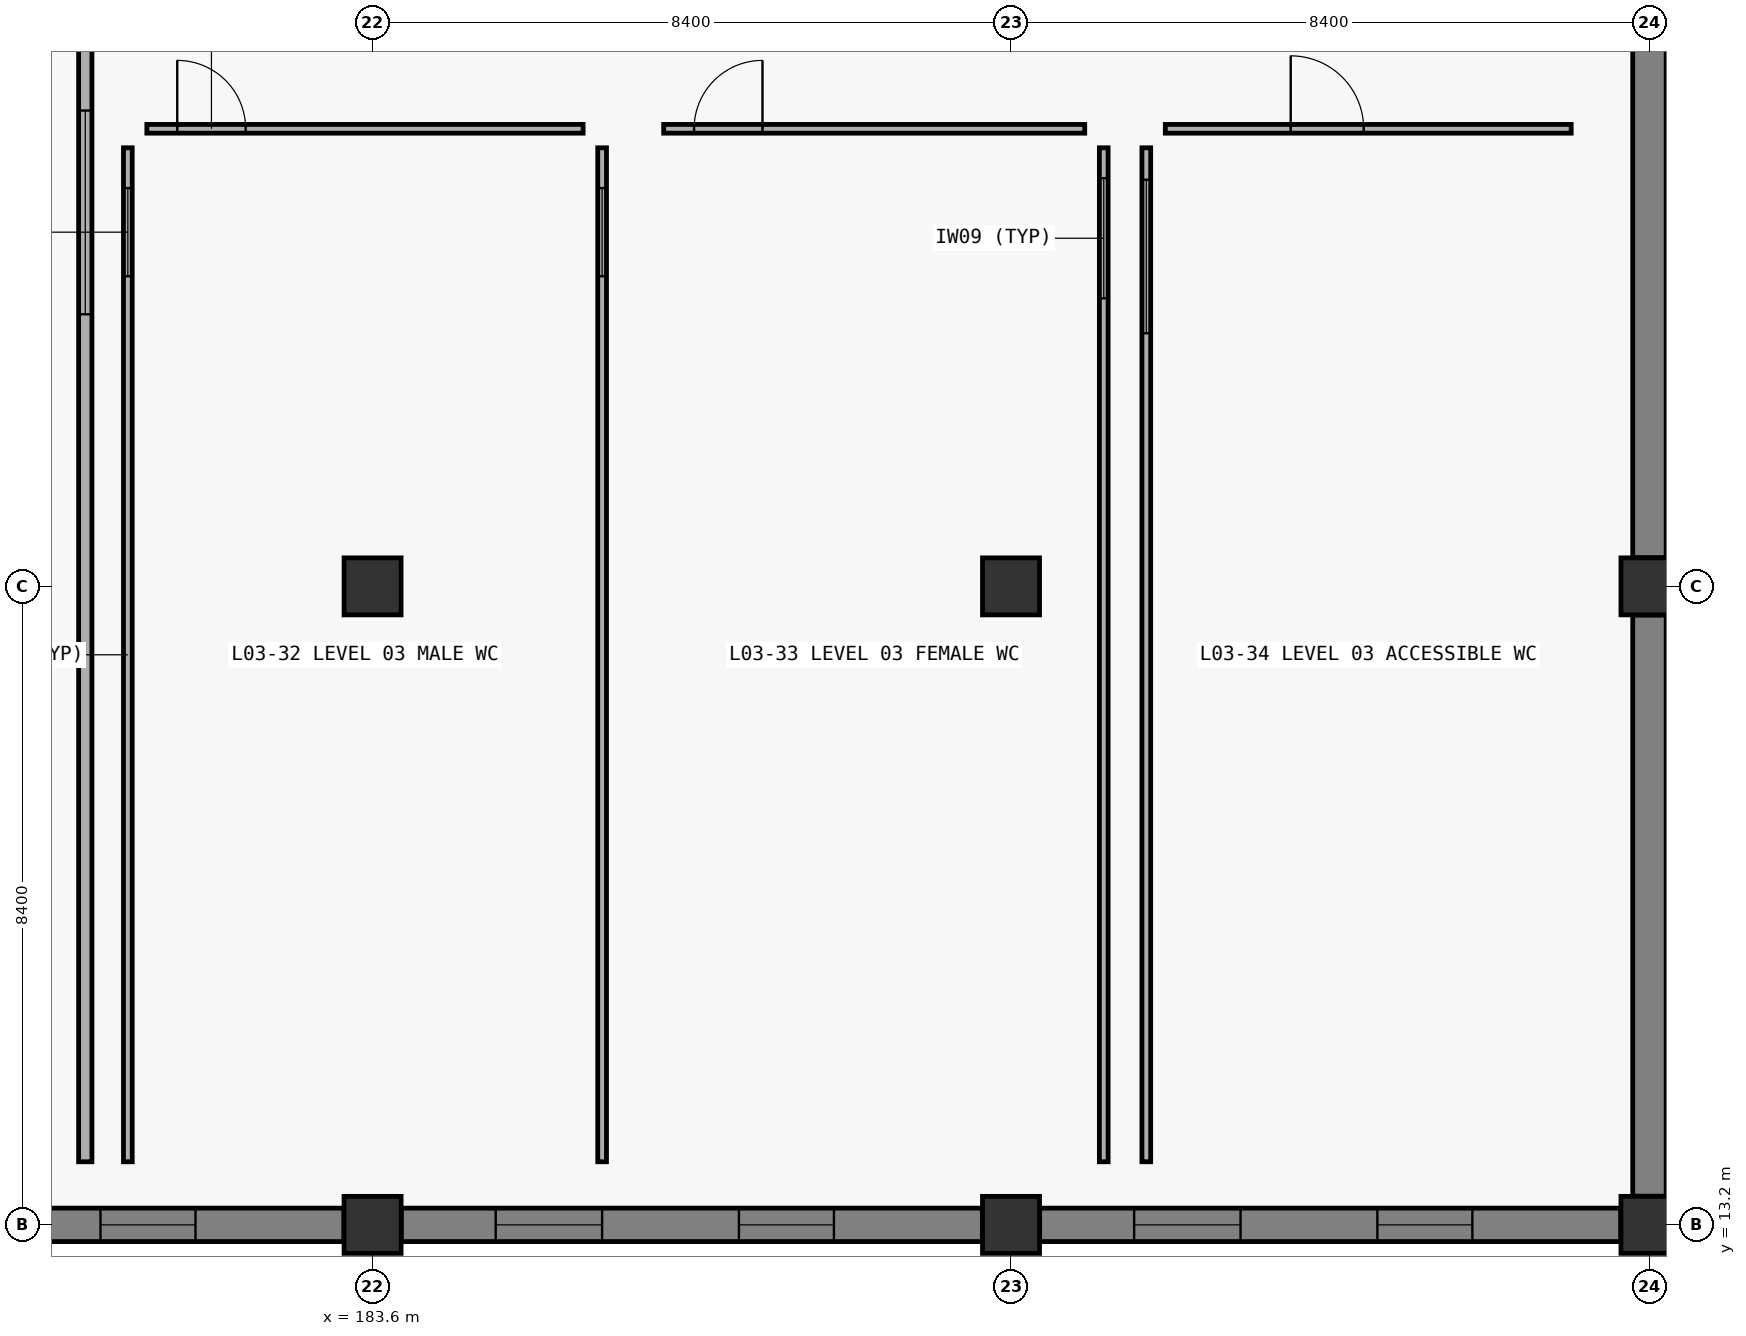
"""IFC4 building model, lengths in metres.
Left out: names, types, materials, properties, quantities, classifications, styles, units other than length and angle.
Written with IfcOpenShell. Run it as: python <this file> out.ifc"""

import sys

from ifc_helpers import new_model, si_unit, direction, frame, frame_2d, origin, origin_2d, place, context, subcontext, project, spatial, rectangle, extrude, element, fill, save


model = new_model("IFC4")
c1 = context("Model", 3, precision=1e-05, world=origin(), true_north=direction((0.0, 1.0)))
c2 = subcontext(c1, "Body", "Model", "MODEL_VIEW")
j1 = project(units=[si_unit("LENGTHUNIT", "METRE"), si_unit("PLANEANGLEUNIT", "RADIAN")], contexts=[c1])
p1 = place(None, origin())
s1 = spatial("IfcSite", under=j1, at=p1, CompositionType="ELEMENT")
p2 = place(p1, origin())
s2 = spatial("IfcBuilding", under=s1, at=p2, CompositionType="ELEMENT")
p3 = place(p2, frame((0.0, 0.0, 15.6)))
s3 = spatial("IfcBuildingStorey", under=s2, at=p3, CompositionType="ELEMENT", Elevation=15.6)
for number, where, z_axis, x_axis in (
    (1, (183.6, 13.2, 0.0), (0.0, 0.0, 1.0), (1.0, 0.0, 0.0)),
    (2, (183.6, 21.6, 0.0), (0.0, 0.0, 1.0), (1.0, 0.0, 0.0)),
    (3, (192.0, 13.2, 0.0), (0.0, 0.0, 1.0), (1.0, 0.0, 0.0)),
    (4, (192.0, 21.6, 0.0), (0.0, 0.0, 1.0), (1.0, 0.0, 0.0)),
    (5, (200.4, 13.2, 0.0), (0.0, 0.0, 1.0), (1.0, 0.0, 0.0)),
    (6, (200.4, 21.6, 0.0), (0.0, 0.0, 1.0), (1.0, 0.0, 0.0)),
):
    element("IfcColumn", number, at=place(p3, frame(where, z_axis=z_axis, x_axis=x_axis)), inside=s3, PredefinedType="COLUMN", context=c2, shape_type="SweptSolid", body=[
        extrude(rectangle(XDim=0.75, YDim=0.75, at=origin_2d()), origin(), (0.0, 0.0, 1.0), 5.1),
    ])
p4 = place(p3, frame((175.577, 13.2, 0.0), z_axis=(0.0, 0.0, 1.0), x_axis=(1.0, 0.0, 0.0)))
e7 = element("IfcWall", 7, at=p4, inside=s3, PredefinedType="SOLIDWALL", context=c2, shape_type="SweptSolid", body=[
    extrude(rectangle(XDim=7.646, YDim=0.44, at=frame_2d((3.823, 0.0))), origin(), (0.0, 0.0, 1.0), 4.36),
])
p5 = place(p4, frame((1.243, 0.0, 0.9)))
e8 = element("IfcOpeningElement", 8, at=p5, cuts=e7, PredefinedType="OPENING", context=c2, shape_type="SweptSolid", body=[
    extrude(rectangle(XDim=1.4, YDim=2.2, at=frame_2d((0.7, 1.1))), frame((0.0, 0.23, 0.0), z_axis=(0.0, -1.0, 0.0), x_axis=(1.0, 0.0, 0.0)), (0.0, 0.0, 1.0), 0.46),
])
p6 = place(p4, frame((4.443, 0.0, 0.9)))
e9 = element("IfcOpeningElement", 9, at=p6, cuts=e7, PredefinedType="OPENING", context=c2, shape_type="SweptSolid", body=[
    extrude(rectangle(XDim=1.25, YDim=2.05, at=frame_2d((0.625, 1.025))), frame((0.0, 0.23, 0.0), z_axis=(0.0, -1.0, 0.0), x_axis=(1.0, 0.0, 0.0)), (0.0, 0.0, 1.0), 0.46),
])
p7 = place(p3, frame((183.977, 13.2, 0.0), z_axis=(0.0, 0.0, 1.0), x_axis=(1.0, 0.0, 0.0)))
e10 = element("IfcWall", 10, at=p7, inside=s3, PredefinedType="SOLIDWALL", context=c2, shape_type="SweptSolid", body=[
    extrude(rectangle(XDim=7.646, YDim=0.44, at=frame_2d((3.823, 0.0))), origin(), (0.0, 0.0, 1.0), 4.11),
])
p8 = place(p7, frame((1.243, 0.0, 0.9)))
e11 = element("IfcOpeningElement", 11, at=p8, cuts=e10, PredefinedType="OPENING", context=c2, shape_type="SweptSolid", body=[
    extrude(rectangle(XDim=1.4, YDim=2.2, at=frame_2d((0.7, 1.1))), frame((0.0, 0.23, 0.0), z_axis=(0.0, -1.0, 0.0), x_axis=(1.0, 0.0, 0.0)), (0.0, 0.0, 1.0), 0.46),
])
p9 = place(p7, frame((4.443, 0.0, 0.9)))
e12 = element("IfcOpeningElement", 12, at=p9, cuts=e10, PredefinedType="OPENING", context=c2, shape_type="SweptSolid", body=[
    extrude(rectangle(XDim=1.25, YDim=2.05, at=frame_2d((0.625, 1.025))), frame((0.0, 0.23, 0.0), z_axis=(0.0, -1.0, 0.0), x_axis=(1.0, 0.0, 0.0)), (0.0, 0.0, 1.0), 0.46),
])
p10 = place(p3, frame((192.377, 13.2, 0.0), z_axis=(0.0, 0.0, 1.0), x_axis=(1.0, 0.0, 0.0)))
e13 = element("IfcWall", 13, at=p10, inside=s3, PredefinedType="SOLIDWALL", context=c2, shape_type="SweptSolid", body=[
    extrude(rectangle(XDim=7.646, YDim=0.44, at=frame_2d((3.823, 0.0))), origin(), (0.0, 0.0, 1.0), 4.36),
])
p11 = place(p10, frame((1.243, 0.0, 0.9)))
e14 = element("IfcOpeningElement", 14, at=p11, cuts=e13, PredefinedType="OPENING", context=c2, shape_type="SweptSolid", body=[
    extrude(rectangle(XDim=1.4, YDim=2.2, at=frame_2d((0.7, 1.1))), frame((0.0, 0.23, 0.0), z_axis=(0.0, -1.0, 0.0), x_axis=(1.0, 0.0, 0.0)), (0.0, 0.0, 1.0), 0.46),
])
p12 = place(p10, frame((4.443, 0.0, 0.9)))
e15 = element("IfcOpeningElement", 15, at=p12, cuts=e13, PredefinedType="OPENING", context=c2, shape_type="SweptSolid", body=[
    extrude(rectangle(XDim=1.25, YDim=2.05, at=frame_2d((0.625, 1.025))), frame((0.0, 0.23, 0.0), z_axis=(0.0, -1.0, 0.0), x_axis=(1.0, 0.0, 0.0)), (0.0, 0.0, 1.0), 0.46),
])
p13 = place(p3, frame((200.4, 13.577, 0.0), z_axis=(0.0, 0.0, 1.0), x_axis=(0.0, 1.0, 0.0)))
e16 = element("IfcWall", 16, at=p13, inside=s3, PredefinedType="SOLIDWALL", context=c2, shape_type="SweptSolid", body=[
    extrude(rectangle(XDim=7.646, YDim=0.44, at=frame_2d((3.823, 0.0))), origin(), (0.0, 0.0, 1.0), 4.31),
])
p14 = place(p3, frame((200.4, 21.977, 0.0), z_axis=(0.0, 0.0, 1.0), x_axis=(0.0, 1.0, 0.0)))
e17 = element("IfcWall", 17, at=p14, inside=s3, PredefinedType="SOLIDWALL", context=c2, shape_type="SweptSolid", body=[
    extrude(rectangle(XDim=8.846, YDim=0.44, at=frame_2d((4.423, 0.0))), origin(), (0.0, 0.0, 1.0), 4.31),
])
p15 = place(p3, frame((179.82, 14.03, 0.0), z_axis=(0.0, 0.0, 1.0), x_axis=(0.0, 1.0, 0.0)))
e18 = element("IfcWall", 18, at=p15, inside=s3, PredefinedType="PARTITIONING", context=c2, shape_type="SweptSolid", body=[
    extrude(rectangle(XDim=16.34, YDim=0.175, at=frame_2d((8.17, 0.0))), origin(), (0.0, 0.0, 1.0), 4.19),
])
p16 = place(p15, frame((11.15, 0.0, 0.9)))
e19 = element("IfcOpeningElement", 19, at=p16, cuts=e18, PredefinedType="OPENING", context=c2, shape_type="SweptSolid", body=[
    extrude(rectangle(XDim=2.68, YDim=1.52, at=frame_2d((1.34, 0.76))), frame((0.0, 0.097, 0.0), z_axis=(0.0, -1.0, 0.0), x_axis=(1.0, 0.0, 0.0)), (0.0, 0.0, 1.0), 0.195),
])
p17 = place(p3, frame((180.63, 27.62, 0.0), z_axis=(0.0, 0.0, 1.0), x_axis=(1.0, 0.0, 0.0)))
e20 = element("IfcWall", 20, at=p17, inside=s3, PredefinedType="PARTITIONING", context=c2, shape_type="SweptSolid", body=[
    extrude(rectangle(XDim=5.74, YDim=0.115, at=frame_2d((2.87, 0.0))), origin(), (0.0, 0.0, 1.0), 3.91),
])
p18 = place(p17, frame((0.4, 0.0, 0.0)))
e21 = element("IfcOpeningElement", 21, at=p18, cuts=e20, PredefinedType="OPENING", context=c2, shape_type="SweptSolid", body=[
    extrude(rectangle(XDim=0.9, YDim=2.1, at=frame_2d((0.45, 1.05))), frame((0.0, 0.067, 0.0), z_axis=(0.0, -1.0, 0.0), x_axis=(1.0, 0.0, 0.0)), (0.0, 0.0, 1.0), 0.135),
])
p19 = place(p3, frame((180.38, 14.03, 0.0), z_axis=(0.0, 0.0, 1.0), x_axis=(0.0, 1.0, 0.0)))
e22 = element("IfcWall", 22, at=p19, inside=s3, PredefinedType="PARTITIONING", context=c2, shape_type="SweptSolid", body=[
    extrude(rectangle(XDim=13.34, YDim=0.115, at=frame_2d((6.67, 0.0))), origin(), (0.0, 0.0, 1.0), 4.19),
])
p20 = place(p19, frame((11.65, 0.0, 0.9)))
e23 = element("IfcOpeningElement", 23, at=p20, cuts=e22, PredefinedType="OPENING", context=c2, shape_type="SweptSolid", body=[
    extrude(rectangle(XDim=1.16, YDim=1.62, at=frame_2d((0.58, 0.81))), frame((0.0, 0.067, 0.0), z_axis=(0.0, -1.0, 0.0), x_axis=(1.0, 0.0, 0.0)), (0.0, 0.0, 1.0), 0.135),
])
p21 = place(p3, frame((186.62, 14.03, 0.0), z_axis=(0.0, 0.0, 1.0), x_axis=(0.0, 1.0, 0.0)))
e24 = element("IfcWall", 24, at=p21, inside=s3, PredefinedType="PARTITIONING", context=c2, shape_type="SweptSolid", body=[
    extrude(rectangle(XDim=13.34, YDim=0.115, at=frame_2d((6.67, 0.0))), origin(), (0.0, 0.0, 1.0), 4.12),
])
p22 = place(p21, frame((11.65, 0.0, 0.9)))
e25 = element("IfcOpeningElement", 25, at=p22, cuts=e24, PredefinedType="OPENING", context=c2, shape_type="SweptSolid", body=[
    extrude(rectangle(XDim=1.16, YDim=1.62, at=frame_2d((0.58, 0.81))), frame((0.0, 0.067, 0.0), z_axis=(0.0, -1.0, 0.0), x_axis=(1.0, 0.0, 0.0)), (0.0, 0.0, 1.0), 0.135),
])
p23 = place(p3, frame((187.43, 27.62, 0.0), z_axis=(0.0, 0.0, 1.0), x_axis=(1.0, 0.0, 0.0)))
e26 = element("IfcWall", 26, at=p23, inside=s3, PredefinedType="PARTITIONING", context=c2, shape_type="SweptSolid", body=[
    extrude(rectangle(XDim=5.54, YDim=0.115, at=frame_2d((2.77, 0.0))), origin(), (0.0, 0.0, 1.0), 4.38),
])
p24 = place(p23, frame((0.4, 0.0, 0.0)))
e27 = element("IfcOpeningElement", 27, at=p24, cuts=e26, PredefinedType="OPENING", context=c2, shape_type="SweptSolid", body=[
    extrude(rectangle(XDim=0.9, YDim=2.1, at=frame_2d((0.45, 1.05))), frame((0.0, 0.067, 0.0), z_axis=(0.0, -1.0, 0.0), x_axis=(1.0, 0.0, 0.0)), (0.0, 0.0, 1.0), 0.135),
])
p25 = place(p3, frame((193.22, 14.03, 0.0), z_axis=(0.0, 0.0, 1.0), x_axis=(0.0, 1.0, 0.0)))
e28 = element("IfcWall", 28, at=p25, inside=s3, PredefinedType="PARTITIONING", context=c2, shape_type="SweptSolid", body=[
    extrude(rectangle(XDim=13.34, YDim=0.115, at=frame_2d((6.67, 0.0))), origin(), (0.0, 0.0, 1.0), 4.11),
])
p26 = place(p25, frame((11.36, 0.0, 0.9)))
e29 = element("IfcOpeningElement", 29, at=p26, cuts=e28, PredefinedType="OPENING", context=c2, shape_type="SweptSolid", body=[
    extrude(rectangle(XDim=1.58, YDim=1.24, at=frame_2d((0.79, 0.62))), frame((0.0, 0.067, 0.0), z_axis=(0.0, -1.0, 0.0), x_axis=(1.0, 0.0, 0.0)), (0.0, 0.0, 1.0), 0.135),
])
p27 = place(p3, frame((194.03, 27.62, 0.0), z_axis=(0.0, 0.0, 1.0), x_axis=(1.0, 0.0, 0.0)))
e30 = element("IfcWall", 30, at=p27, inside=s3, PredefinedType="PARTITIONING", context=c2, shape_type="SweptSolid", body=[
    extrude(rectangle(XDim=5.34, YDim=0.115, at=frame_2d((2.67, 0.0))), origin(), (0.0, 0.0, 1.0), 4.38),
])
p28 = place(p27, frame((1.65, 0.0, 0.0)))
e31 = element("IfcOpeningElement", 31, at=p28, cuts=e30, PredefinedType="OPENING", context=c2, shape_type="SweptSolid", body=[
    extrude(rectangle(XDim=0.96, YDim=2.14, at=frame_2d((0.48, 1.07))), frame((0.0, 0.067, 0.0), z_axis=(0.0, -1.0, 0.0), x_axis=(1.0, 0.0, 0.0)), (0.0, 0.0, 1.0), 0.135),
])
p29 = place(p3, frame((193.78, 14.03, 0.0), z_axis=(0.0, 0.0, 1.0), x_axis=(0.0, 1.0, 0.0)))
e32 = element("IfcWall", 32, at=p29, inside=s3, PredefinedType="PARTITIONING", context=c2, shape_type="SweptSolid", body=[
    extrude(rectangle(XDim=13.34, YDim=0.115, at=frame_2d((6.67, 0.0))), origin(), (0.0, 0.0, 1.0), 4.11),
])
p30 = place(p29, frame((10.9, 0.0, 0.9)))
e33 = element("IfcOpeningElement", 33, at=p30, cuts=e32, PredefinedType="OPENING", context=c2, shape_type="SweptSolid", body=[
    extrude(rectangle(XDim=2.02, YDim=1.32, at=frame_2d((1.01, 0.66))), frame((0.0, 0.067, 0.0), z_axis=(0.0, -1.0, 0.0), x_axis=(1.0, 0.0, 0.0)), (0.0, 0.0, 1.0), 0.135),
])
p31 = place(p6, origin())
e34 = element("IfcWindow", 34, at=p31, inside=s3, PartitioningType="SINGLE_PANEL", PredefinedType="WINDOW", context=c2, shape_type="SweptSolid", body=[
    extrude(rectangle(XDim=1.25, YDim=2.05, at=frame_2d((0.625, 1.025))), frame((0.0, 0.03, 0.0), z_axis=(0.0, -1.0, 0.0), x_axis=(1.0, 0.0, 0.0)), (0.0, 0.0, 1.0), 0.06),
])
fill(e9, e34)
p32 = place(p8, origin())
e35 = element("IfcWindow", 35, at=p32, inside=s3, PartitioningType="SINGLE_PANEL", PredefinedType="WINDOW", context=c2, shape_type="SweptSolid", body=[
    extrude(rectangle(XDim=1.4, YDim=2.2, at=frame_2d((0.7, 1.1))), frame((0.0, 0.03, 0.0), z_axis=(0.0, -1.0, 0.0), x_axis=(1.0, 0.0, 0.0)), (0.0, 0.0, 1.0), 0.06),
])
fill(e11, e35)
p33 = place(p9, origin())
e36 = element("IfcWindow", 36, at=p33, inside=s3, PartitioningType="SINGLE_PANEL", PredefinedType="WINDOW", context=c2, shape_type="SweptSolid", body=[
    extrude(rectangle(XDim=1.25, YDim=2.05, at=frame_2d((0.625, 1.025))), frame((0.0, 0.03, 0.0), z_axis=(0.0, -1.0, 0.0), x_axis=(1.0, 0.0, 0.0)), (0.0, 0.0, 1.0), 0.06),
])
fill(e12, e36)
p34 = place(p11, origin())
e37 = element("IfcWindow", 37, at=p34, inside=s3, PartitioningType="SINGLE_PANEL", PredefinedType="WINDOW", context=c2, shape_type="SweptSolid", body=[
    extrude(rectangle(XDim=1.4, YDim=2.2, at=frame_2d((0.7, 1.1))), frame((0.0, 0.03, 0.0), z_axis=(0.0, -1.0, 0.0), x_axis=(1.0, 0.0, 0.0)), (0.0, 0.0, 1.0), 0.06),
])
fill(e14, e37)
p35 = place(p12, origin())
e38 = element("IfcWindow", 38, at=p35, inside=s3, PartitioningType="SINGLE_PANEL", PredefinedType="WINDOW", context=c2, shape_type="SweptSolid", body=[
    extrude(rectangle(XDim=1.25, YDim=2.05, at=frame_2d((0.625, 1.025))), frame((0.0, 0.03, 0.0), z_axis=(0.0, -1.0, 0.0), x_axis=(1.0, 0.0, 0.0)), (0.0, 0.0, 1.0), 0.06),
])
fill(e15, e38)
p36 = place(p16, origin())
e39 = element("IfcWindow", 39, at=p36, inside=s3, PartitioningType="SINGLE_PANEL", PredefinedType="WINDOW", context=c2, shape_type="SweptSolid", body=[
    extrude(rectangle(XDim=2.68, YDim=1.52, at=frame_2d((1.34, 0.76))), frame((0.0, 0.03, 0.0), z_axis=(0.0, -1.0, 0.0), x_axis=(1.0, 0.0, 0.0)), (0.0, 0.0, 1.0), 0.06),
])
fill(e19, e39)
p37 = place(p18, origin())
e40 = element("IfcDoor", 40, at=p37, inside=s3, OperationType="SINGLE_SWING_LEFT", PredefinedType="DOOR", context=c2, shape_type="SweptSolid", body=[
    extrude(rectangle(XDim=0.9, YDim=2.1, at=frame_2d((0.45, 1.05))), frame((0.0, 0.025, 0.0), z_axis=(0.0, -1.0, 0.0), x_axis=(1.0, 0.0, 0.0)), (0.0, 0.0, 1.0), 0.05),
])
fill(e21, e40)
p38 = place(p20, origin())
e41 = element("IfcWindow", 41, at=p38, inside=s3, PartitioningType="SINGLE_PANEL", PredefinedType="WINDOW", context=c2, shape_type="SweptSolid", body=[
    extrude(rectangle(XDim=1.16, YDim=1.62, at=frame_2d((0.58, 0.81))), frame((0.0, 0.03, 0.0), z_axis=(0.0, -1.0, 0.0), x_axis=(1.0, 0.0, 0.0)), (0.0, 0.0, 1.0), 0.06),
])
fill(e23, e41)
p39 = place(p22, origin())
e42 = element("IfcWindow", 42, at=p39, inside=s3, PartitioningType="SINGLE_PANEL", PredefinedType="WINDOW", context=c2, shape_type="SweptSolid", body=[
    extrude(rectangle(XDim=1.16, YDim=1.62, at=frame_2d((0.58, 0.81))), frame((0.0, 0.03, 0.0), z_axis=(0.0, -1.0, 0.0), x_axis=(1.0, 0.0, 0.0)), (0.0, 0.0, 1.0), 0.06),
])
fill(e25, e42)
p40 = place(p24, origin())
e43 = element("IfcDoor", 43, at=p40, inside=s3, OperationType="SINGLE_SWING_RIGHT", PredefinedType="DOOR", context=c2, shape_type="SweptSolid", body=[
    extrude(rectangle(XDim=0.9, YDim=2.1, at=frame_2d((0.45, 1.05))), frame((0.0, 0.025, 0.0), z_axis=(0.0, -1.0, 0.0), x_axis=(1.0, 0.0, 0.0)), (0.0, 0.0, 1.0), 0.05),
])
fill(e27, e43)
p41 = place(p26, origin())
e44 = element("IfcWindow", 44, at=p41, inside=s3, PartitioningType="SINGLE_PANEL", PredefinedType="WINDOW", context=c2, shape_type="SweptSolid", body=[
    extrude(rectangle(XDim=1.58, YDim=1.24, at=frame_2d((0.79, 0.62))), frame((0.0, 0.03, 0.0), z_axis=(0.0, -1.0, 0.0), x_axis=(1.0, 0.0, 0.0)), (0.0, 0.0, 1.0), 0.06),
])
fill(e29, e44)
p42 = place(p28, origin())
e45 = element("IfcDoor", 45, at=p42, inside=s3, OperationType="SINGLE_SWING_LEFT", PredefinedType="DOOR", context=c2, shape_type="SweptSolid", body=[
    extrude(rectangle(XDim=0.96, YDim=2.14, at=frame_2d((0.48, 1.07))), frame((0.0, 0.025, 0.0), z_axis=(0.0, -1.0, 0.0), x_axis=(1.0, 0.0, 0.0)), (0.0, 0.0, 1.0), 0.05),
])
fill(e31, e45)
p43 = place(p30, origin())
e46 = element("IfcWindow", 46, at=p43, inside=s3, PartitioningType="SINGLE_PANEL", PredefinedType="WINDOW", context=c2, shape_type="SweptSolid", body=[
    extrude(rectangle(XDim=2.02, YDim=1.32, at=frame_2d((1.01, 0.66))), frame((0.0, 0.03, 0.0), z_axis=(0.0, -1.0, 0.0), x_axis=(1.0, 0.0, 0.0)), (0.0, 0.0, 1.0), 0.06),
])
fill(e33, e46)
save(model, sys.argv[1])
